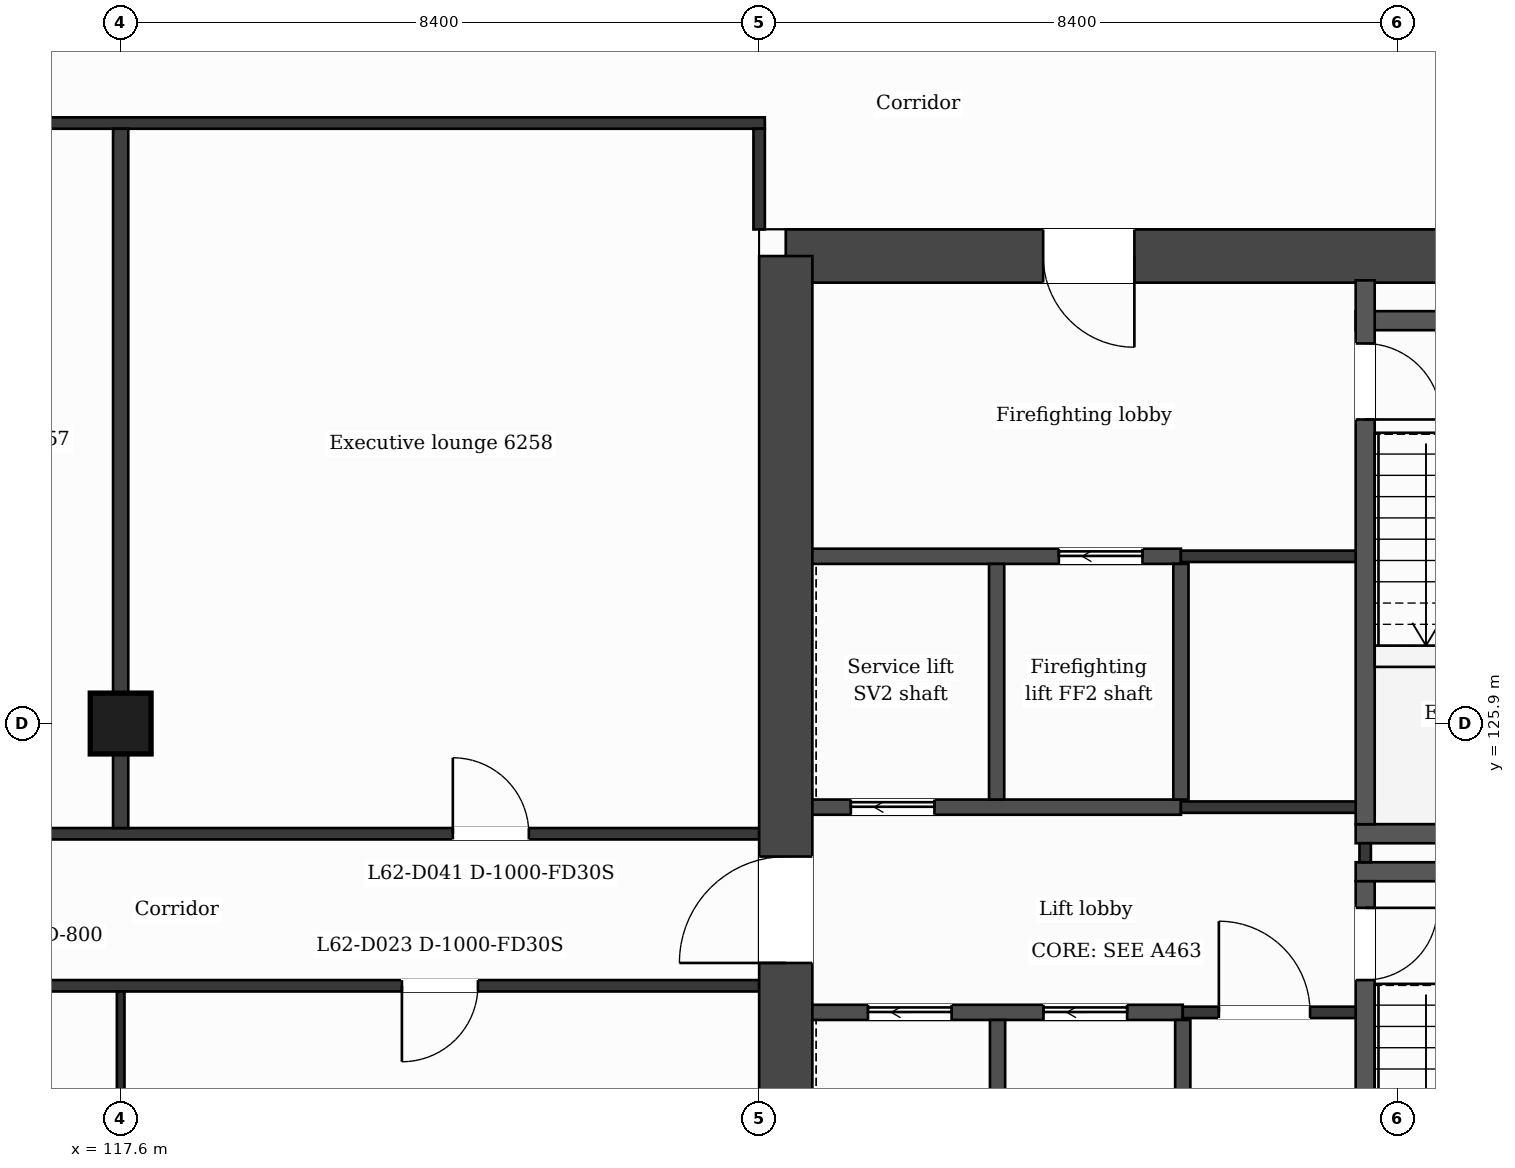
"""IFC4 building model, lengths in metres.
Left out: names, types, materials, properties, quantities, classifications, styles, units other than length and angle.
Written with IfcOpenShell. Run it as: python <this file> out.ifc"""

import sys

from ifc_helpers import new_model, si_unit, direction, frame, frame_2d, origin, origin_2d, place, context, subcontext, project, spatial, rectangle, extrude, element, fill, save


model = new_model("IFC4")
c1 = context("Model", 3, precision=1e-05, world=origin(), true_north=direction((0.0, 1.0)))
c2 = subcontext(c1, "Body", "Model", "MODEL_VIEW")
j1 = project(units=[si_unit("LENGTHUNIT", "METRE"), si_unit("PLANEANGLEUNIT", "RADIAN")], contexts=[c1])
p1 = place(None, origin())
s1 = spatial("IfcSite", under=j1, at=p1, CompositionType="ELEMENT")
p2 = place(p1, origin())
s2 = spatial("IfcBuilding", under=s1, at=p2, CompositionType="ELEMENT")
p3 = place(p2, frame((0.0, 0.0, 259.0)))
s3 = spatial("IfcBuildingStorey", under=s2, at=p3, CompositionType="ELEMENT", Elevation=259.0)
p4 = place(p3, frame((126.35, 132.05, 0.0), z_axis=(0.0, 0.0, 1.0), x_axis=(1.0, 0.0, 0.0)))
e1 = element("IfcWall", 1, at=p4, inside=s3, PredefinedType="SHEAR", context=c2, shape_type="SweptSolid", body=[
    extrude(rectangle(XDim=11.513, YDim=0.7, at=frame_2d((5.757, 0.0))), origin(), (0.0, 0.0, 1.0), 3.7),
])
p5 = place(p4, frame((3.386, 0.0, 0.0)))
e2 = element("IfcOpeningElement", 2, at=p5, cuts=e1, PredefinedType="OPENING", context=c2, shape_type="SweptSolid", body=[
    extrude(rectangle(XDim=1.2, YDim=2.1, at=frame_2d((0.6, 1.05))), frame((0.0, 0.36, 0.0), z_axis=(0.0, -1.0, 0.0), x_axis=(1.0, 0.0, 0.0)), (0.0, 0.0, 1.0), 0.72),
])
p6 = place(p3, frame((126.35, 110.75, 0.0), z_axis=(0.0, 0.0, 1.0), x_axis=(0.0, 1.0, 0.0)))
e3 = element("IfcWall", 3, at=p6, inside=s3, PredefinedType="SHEAR", context=c2, shape_type="SweptSolid", body=[
    extrude(rectangle(XDim=21.3, YDim=0.7, at=frame_2d((10.65, 0.0))), origin(), (0.0, 0.0, 1.0), 3.7),
])
p7 = place(p6, frame((12.0, 0.0, 0.0)))
e4 = element("IfcOpeningElement", 4, at=p7, cuts=e3, PredefinedType="OPENING", context=c2, shape_type="SweptSolid", body=[
    extrude(rectangle(XDim=1.4, YDim=2.1, at=frame_2d((0.7, 1.05))), frame((0.0, 0.36, 0.0), z_axis=(0.0, -1.0, 0.0), x_axis=(1.0, 0.0, 0.0)), (0.0, 0.0, 1.0), 0.72),
])
p8 = place(p3, frame((117.6, 125.9, 0.0), z_axis=(0.0, 0.0, 1.0), x_axis=(1.0, 0.0, 0.0)))
e5 = element("IfcColumn", 5, at=p8, inside=s3, PredefinedType="COLUMN", context=c2, shape_type="SweptSolid", body=[
    extrude(rectangle(XDim=0.8, YDim=0.8, at=origin_2d()), origin(), (0.0, 0.0, 1.0), 3.7),
])
p9 = place(p3, frame((126.7, 122.1, 0.0), z_axis=(0.0, 0.0, 1.0), x_axis=(1.0, 0.0, 0.0)))
e6 = element("IfcWall", 6, at=p9, inside=s3, PredefinedType="PARTITIONING", context=c2, shape_type="SweptSolid", body=[
    extrude(rectangle(XDim=4.873, YDim=0.2, at=frame_2d((2.437, 0.0))), origin(), (0.0, 0.0, 1.0), 3.38),
])
p10 = place(p9, frame((3.041, 0.0, 0.0)))
e7 = element("IfcOpeningElement", 7, at=p10, cuts=e6, PredefinedType="OPENING", context=c2, shape_type="SweptSolid", body=[
    extrude(rectangle(XDim=1.1, YDim=2.1, at=frame_2d((0.55, 1.05))), frame((0.0, 0.11, 0.0), z_axis=(0.0, -1.0, 0.0), x_axis=(1.0, 0.0, 0.0)), (0.0, 0.0, 1.0), 0.22),
])
p11 = place(p9, frame((0.732, 0.0, 0.0)))
e8 = element("IfcOpeningElement", 8, at=p11, cuts=e6, PredefinedType="OPENING", context=c2, shape_type="SweptSolid", body=[
    extrude(rectangle(XDim=1.1, YDim=2.1, at=frame_2d((0.55, 1.05))), frame((0.0, 0.11, 0.0), z_axis=(0.0, -1.0, 0.0), x_axis=(1.0, 0.0, 0.0)), (0.0, 0.0, 1.0), 0.22),
])
p12 = place(p3, frame((131.573, 122.1, 0.0), z_axis=(0.0, 0.0, 1.0), x_axis=(1.0, 0.0, 0.0)))
e9 = element("IfcWall", 9, at=p12, inside=s3, PredefinedType="PARTITIONING", context=c2, shape_type="SweptSolid", body=[
    extrude(rectangle(XDim=2.4, YDim=0.15, at=frame_2d((1.2, 0.0))), origin(), (0.0, 0.0, 1.0), 3.38),
])
p13 = place(p12, frame((0.475, 0.0, 0.0)))
e10 = element("IfcOpeningElement", 10, at=p13, cuts=e9, PredefinedType="OPENING", context=c2, shape_type="SweptSolid", body=[
    extrude(rectangle(XDim=1.2, YDim=2.1, at=frame_2d((0.6, 1.05))), frame((0.0, 0.085, 0.0), z_axis=(0.0, -1.0, 0.0), x_axis=(1.0, 0.0, 0.0)), (0.0, 0.0, 1.0), 0.17),
])
p14 = place(p3, frame((100.8, 122.45, 0.0), z_axis=(0.0, 0.0, 1.0), x_axis=(1.0, 0.0, 0.0)))
e11 = element("IfcWall", 11, at=p14, inside=s3, PredefinedType="PARTITIONING", context=c2, shape_type="SweptSolid", body=[
    extrude(rectangle(XDim=25.2, YDim=0.15, at=frame_2d((12.6, 0.0))), origin(), (0.0, 0.0, 1.0), 3.38),
])
p15 = place(p14, frame((0.63, 0.0, 0.0)))
e12 = element("IfcOpeningElement", 12, at=p15, cuts=e11, PredefinedType="OPENING", context=c2, shape_type="SweptSolid", body=[
    extrude(rectangle(XDim=1.0, YDim=2.1, at=frame_2d((0.5, 1.05))), frame((0.0, 0.085, 0.0), z_axis=(0.0, -1.0, 0.0), x_axis=(1.0, 0.0, 0.0)), (0.0, 0.0, 1.0), 0.17),
])
p16 = place(p14, frame((6.875, 0.0, 0.0)))
e13 = element("IfcOpeningElement", 13, at=p16, cuts=e11, PredefinedType="OPENING", context=c2, shape_type="SweptSolid", body=[
    extrude(rectangle(XDim=0.95, YDim=2.1, at=frame_2d((0.475, 1.05))), frame((0.0, 0.085, 0.0), z_axis=(0.0, -1.0, 0.0), x_axis=(1.0, 0.0, 0.0)), (0.0, 0.0, 1.0), 0.17),
])
p17 = place(p14, frame((8.925, 0.0, 0.0)))
e14 = element("IfcOpeningElement", 14, at=p17, cuts=e11, PredefinedType="OPENING", context=c2, shape_type="SweptSolid", body=[
    extrude(rectangle(XDim=1.0, YDim=2.1, at=frame_2d((0.5, 1.05))), frame((0.0, 0.085, 0.0), z_axis=(0.0, -1.0, 0.0), x_axis=(1.0, 0.0, 0.0)), (0.0, 0.0, 1.0), 0.17),
])
p18 = place(p14, frame((20.5, 0.0, 0.0)))
e15 = element("IfcOpeningElement", 15, at=p18, cuts=e11, PredefinedType="OPENING", context=c2, shape_type="SweptSolid", body=[
    extrude(rectangle(XDim=1.0, YDim=2.1, at=frame_2d((0.5, 1.05))), frame((0.0, 0.085, 0.0), z_axis=(0.0, -1.0, 0.0), x_axis=(1.0, 0.0, 0.0)), (0.0, 0.0, 1.0), 0.17),
])
for number, where, z_axis, x_axis in (
    (16, (133.848, 123.95, 0.0), (0.0, 0.0, 1.0), (1.0, 0.0, 0.0)),
    (17, (133.848, 124.45, 0.0), (0.0, 0.0, 1.0), (1.0, 0.0, 0.0)),
):
    element("IfcWall", number, at=place(p3, frame(where, z_axis=z_axis, x_axis=x_axis)), inside=s3, PredefinedType="PARTITIONING", context=c2, shape_type="SweptSolid", body=[
        extrude(rectangle(XDim=3.4, YDim=0.25, at=frame_2d((1.7, 0.0))), origin(), (0.0, 0.0, 1.0), 3.38),
    ])
p19 = place(p3, frame((100.8, 124.45, 0.0), z_axis=(0.0, 0.0, 1.0), x_axis=(1.0, 0.0, 0.0)))
e18 = element("IfcWall", 18, at=p19, inside=s3, PredefinedType="PARTITIONING", context=c2, shape_type="SweptSolid", body=[
    extrude(rectangle(XDim=25.2, YDim=0.15, at=frame_2d((12.6, 0.0))), origin(), (0.0, 0.0, 1.0), 3.38),
])
p20 = place(p19, frame((2.025, 0.0, 0.0)))
e19 = element("IfcOpeningElement", 19, at=p20, cuts=e18, PredefinedType="OPENING", context=c2, shape_type="SweptSolid", body=[
    extrude(rectangle(XDim=1.0, YDim=2.1, at=frame_2d((0.5, 1.05))), frame((0.0, 0.085, 0.0), z_axis=(0.0, -1.0, 0.0), x_axis=(1.0, 0.0, 0.0)), (0.0, 0.0, 1.0), 0.17),
])
p21 = place(p19, frame((9.27, 0.0, 0.0)))
e20 = element("IfcOpeningElement", 20, at=p21, cuts=e18, PredefinedType="OPENING", context=c2, shape_type="SweptSolid", body=[
    extrude(rectangle(XDim=1.0, YDim=2.1, at=frame_2d((0.5, 1.05))), frame((0.0, 0.085, 0.0), z_axis=(0.0, -1.0, 0.0), x_axis=(1.0, 0.0, 0.0)), (0.0, 0.0, 1.0), 0.17),
])
p22 = place(p19, frame((13.575, 0.0, 0.0)))
e21 = element("IfcOpeningElement", 21, at=p22, cuts=e18, PredefinedType="OPENING", context=c2, shape_type="SweptSolid", body=[
    extrude(rectangle(XDim=1.0, YDim=2.1, at=frame_2d((0.5, 1.05))), frame((0.0, 0.085, 0.0), z_axis=(0.0, -1.0, 0.0), x_axis=(1.0, 0.0, 0.0)), (0.0, 0.0, 1.0), 0.17),
])
p23 = place(p19, frame((21.17, 0.0, 0.0)))
e22 = element("IfcOpeningElement", 22, at=p23, cuts=e18, PredefinedType="OPENING", context=c2, shape_type="SweptSolid", body=[
    extrude(rectangle(XDim=1.0, YDim=2.1, at=frame_2d((0.5, 1.05))), frame((0.0, 0.085, 0.0), z_axis=(0.0, -1.0, 0.0), x_axis=(1.0, 0.0, 0.0)), (0.0, 0.0, 1.0), 0.17),
])
p24 = place(p3, frame((126.7, 124.8, 0.0), z_axis=(0.0, 0.0, 1.0), x_axis=(1.0, 0.0, 0.0)))
e23 = element("IfcWall", 23, at=p24, inside=s3, PredefinedType="PARTITIONING", context=c2, shape_type="SweptSolid", body=[
    extrude(rectangle(XDim=4.849, YDim=0.2, at=frame_2d((2.424, 0.0))), origin(), (0.0, 0.0, 1.0), 3.38),
])
p25 = place(p24, frame((0.506, 0.0, 0.0)))
e24 = element("IfcOpeningElement", 24, at=p25, cuts=e23, PredefinedType="OPENING", context=c2, shape_type="SweptSolid", body=[
    extrude(rectangle(XDim=1.1, YDim=2.1, at=frame_2d((0.55, 1.05))), frame((0.0, 0.11, 0.0), z_axis=(0.0, -1.0, 0.0), x_axis=(1.0, 0.0, 0.0)), (0.0, 0.0, 1.0), 0.22),
])
p26 = place(p3, frame((131.549, 124.8, 0.0), z_axis=(0.0, 0.0, 1.0), x_axis=(1.0, 0.0, 0.0)))
e25 = element("IfcWall", 25, at=p26, inside=s3, PredefinedType="PARTITIONING", context=c2, shape_type="SweptSolid", body=[
    extrude(rectangle(XDim=2.549, YDim=0.15, at=frame_2d((1.275, 0.0))), origin(), (0.0, 0.0, 1.0), 3.38),
])
p27 = place(p3, frame((126.7, 128.1, 0.0), z_axis=(0.0, 0.0, 1.0), x_axis=(1.0, 0.0, 0.0)))
e26 = element("IfcWall", 26, at=p27, inside=s3, PredefinedType="PARTITIONING", context=c2, shape_type="SweptSolid", body=[
    extrude(rectangle(XDim=4.849, YDim=0.2, at=frame_2d((2.424, 0.0))), origin(), (0.0, 0.0, 1.0), 3.38),
])
p28 = place(p27, frame((3.243, 0.0, 0.0)))
e27 = element("IfcOpeningElement", 27, at=p28, cuts=e26, PredefinedType="OPENING", context=c2, shape_type="SweptSolid", body=[
    extrude(rectangle(XDim=1.1, YDim=2.1, at=frame_2d((0.55, 1.05))), frame((0.0, 0.11, 0.0), z_axis=(0.0, -1.0, 0.0), x_axis=(1.0, 0.0, 0.0)), (0.0, 0.0, 1.0), 0.22),
])
p29 = place(p3, frame((131.549, 128.1, 0.0), z_axis=(0.0, 0.0, 1.0), x_axis=(1.0, 0.0, 0.0)))
e28 = element("IfcWall", 28, at=p29, inside=s3, PredefinedType="PARTITIONING", context=c2, shape_type="SweptSolid", body=[
    extrude(rectangle(XDim=2.424, YDim=0.15, at=frame_2d((1.212, 0.0))), origin(), (0.0, 0.0, 1.0), 3.38),
])
p30 = place(p3, frame((133.848, 131.2, 0.0), z_axis=(0.0, 0.0, 1.0), x_axis=(1.0, 0.0, 0.0)))
e29 = element("IfcWall", 29, at=p30, inside=s3, PredefinedType="PARTITIONING", context=c2, shape_type="SweptSolid", body=[
    extrude(rectangle(XDim=3.807, YDim=0.25, at=frame_2d((1.903, 0.0))), origin(), (0.0, 0.0, 1.0), 3.38),
])
p31 = place(p3, frame((100.725, 133.8, 0.0), z_axis=(0.0, 0.0, 1.0), x_axis=(1.0, 0.0, 0.0)))
e30 = element("IfcWall", 30, at=p31, inside=s3, PredefinedType="PARTITIONING", context=c2, shape_type="SweptSolid", body=[
    extrude(rectangle(XDim=25.35, YDim=0.15, at=frame_2d((12.675, 0.0))), origin(), (0.0, 0.0, 1.0), 3.38),
])
p32 = place(p31, frame((10.7, 0.0, 0.0)))
e31 = element("IfcOpeningElement", 31, at=p32, cuts=e30, PredefinedType="OPENING", context=c2, shape_type="SweptSolid", body=[
    extrude(rectangle(XDim=1.0, YDim=2.1, at=frame_2d((0.5, 1.05))), frame((0.0, 0.085, 0.0), z_axis=(0.0, -1.0, 0.0), x_axis=(1.0, 0.0, 0.0)), (0.0, 0.0, 1.0), 0.17),
])
p33 = place(p3, frame((117.6, 110.55, 0.0), z_axis=(0.0, 0.0, 1.0), x_axis=(0.0, 1.0, 0.0)))
e32 = element("IfcWall", 32, at=p33, inside=s3, PredefinedType="PARTITIONING", context=c2, shape_type="SweptSolid", body=[
    extrude(rectangle(XDim=11.825, YDim=0.1, at=frame_2d((5.913, 0.0))), origin(), (0.0, 0.0, 1.0), 3.38),
])
p34 = place(p33, frame((9.09, 0.0, 0.0)))
e33 = element("IfcOpeningElement", 33, at=p34, cuts=e32, PredefinedType="OPENING", context=c2, shape_type="SweptSolid", body=[
    extrude(rectangle(XDim=0.9, YDim=2.1, at=frame_2d((0.45, 1.05))), frame((0.0, 0.06, 0.0), z_axis=(0.0, -1.0, 0.0), x_axis=(1.0, 0.0, 0.0)), (0.0, 0.0, 1.0), 0.12),
])
p35 = place(p3, frame((117.6, 124.525, 0.0), z_axis=(0.0, 0.0, 1.0), x_axis=(0.0, 1.0, 0.0)))
e34 = element("IfcWall", 34, at=p35, inside=s3, PredefinedType="PARTITIONING", context=c2, shape_type="SweptSolid", body=[
    extrude(rectangle(XDim=9.2, YDim=0.2, at=frame_2d((4.6, 0.0))), origin(), (0.0, 0.0, 1.0), 3.38),
])
p36 = place(p3, frame((126.0, 132.4, 0.0), z_axis=(0.0, 0.0, 1.0), x_axis=(0.0, 1.0, 0.0)))
e35 = element("IfcWall", 35, at=p36, inside=s3, PredefinedType="PARTITIONING", context=c2, shape_type="SweptSolid", body=[
    extrude(rectangle(XDim=1.325, YDim=0.15, at=frame_2d((0.663, 0.0))), origin(), (0.0, 0.0, 1.0), 3.38),
])
for number, where, z_axis, x_axis in (
    (36, (129.124, 124.9, 0.0), (0.0, 0.0, 1.0), (0.0, 1.0, 0.0)),
    (37, (129.136, 118.9, 0.0), (0.0, 0.0, 1.0), (0.0, 1.0, 0.0)),
    (38, (131.549, 124.9, 0.0), (0.0, 0.0, 1.0), (0.0, 1.0, 0.0)),
):
    element("IfcWall", number, at=place(p3, frame(where, z_axis=z_axis, x_axis=x_axis)), inside=s3, PredefinedType="PARTITIONING", context=c2, shape_type="SweptSolid", body=[
        extrude(rectangle(XDim=3.1, YDim=0.2, at=frame_2d((1.55, 0.0))), origin(), (0.0, 0.0, 1.0), 3.38),
    ])
p37 = place(p3, frame((131.573, 116.67, 0.0), z_axis=(0.0, 0.0, 1.0), x_axis=(0.0, 1.0, 0.0)))
e39 = element("IfcWall", 39, at=p37, inside=s3, PredefinedType="PARTITIONING", context=c2, shape_type="SweptSolid", body=[
    extrude(rectangle(XDim=5.33, YDim=0.2, at=frame_2d((2.665, 0.0))), origin(), (0.0, 0.0, 1.0), 3.38),
])
p38 = place(p37, frame((0.88, 0.0, 0.0)))
e40 = element("IfcOpeningElement", 40, at=p38, cuts=e39, PredefinedType="OPENING", context=c2, shape_type="SweptSolid", body=[
    extrude(rectangle(XDim=0.9, YDim=2.1, at=frame_2d((0.45, 1.05))), frame((0.0, 0.11, 0.0), z_axis=(0.0, -1.0, 0.0), x_axis=(1.0, 0.0, 0.0)), (0.0, 0.0, 1.0), 0.22),
])
p39 = place(p3, frame((133.973, 124.075, 0.0), z_axis=(0.0, 0.0, 1.0), x_axis=(0.0, 1.0, 0.0)))
e41 = element("IfcWall", 41, at=p39, inside=s3, PredefinedType="PARTITIONING", context=c2, shape_type="SweptSolid", body=[
    extrude(rectangle(XDim=0.25, YDim=0.15, at=frame_2d((0.125, 0.0))), origin(), (0.0, 0.0, 1.0), 3.38),
])
p40 = place(p3, frame((133.973, 116.67, 0.0), z_axis=(0.0, 0.0, 1.0), x_axis=(0.0, 1.0, 0.0)))
e42 = element("IfcWall", 42, at=p40, inside=s3, PredefinedType="PARTITIONING", context=c2, shape_type="SweptSolid", body=[
    extrude(rectangle(XDim=7.155, YDim=0.25, at=frame_2d((3.578, 0.0))), origin(), (0.0, 0.0, 1.0), 3.38),
])
p41 = place(p40, frame((5.855, 0.0, 0.0)))
e43 = element("IfcOpeningElement", 43, at=p41, cuts=e42, PredefinedType="OPENING", context=c2, shape_type="SweptSolid", body=[
    extrude(rectangle(XDim=0.95, YDim=2.1, at=frame_2d((0.475, 1.05))), frame((0.0, 0.135, 0.0), z_axis=(0.0, -1.0, 0.0), x_axis=(1.0, 0.0, 0.0)), (0.0, 0.0, 1.0), 0.27),
])
p42 = place(p3, frame((133.973, 124.575, 0.0), z_axis=(0.0, 0.0, 1.0), x_axis=(0.0, 1.0, 0.0)))
e44 = element("IfcWall", 44, at=p42, inside=s3, PredefinedType="PARTITIONING", context=c2, shape_type="SweptSolid", body=[
    extrude(rectangle(XDim=7.155, YDim=0.25, at=frame_2d((3.578, 0.0))), origin(), (0.0, 0.0, 1.0), 3.38),
])
p43 = place(p42, frame((5.325, 0.0, 0.0)))
e45 = element("IfcOpeningElement", 45, at=p43, cuts=e44, PredefinedType="OPENING", context=c2, shape_type="SweptSolid", body=[
    extrude(rectangle(XDim=1.0, YDim=2.1, at=frame_2d((0.5, 1.05))), frame((0.0, 0.135, 0.0), z_axis=(0.0, -1.0, 0.0), x_axis=(1.0, 0.0, 0.0)), (0.0, 0.0, 1.0), 0.27),
])
p44 = place(p13, origin())
e46 = element("IfcDoor", 46, at=p44, inside=s3, OperationType="SINGLE_SWING_LEFT", PredefinedType="DOOR", context=c2, shape_type="SweptSolid", body=[
    extrude(rectangle(XDim=1.2, YDim=2.1, at=frame_2d((0.6, 1.05))), frame((0.0, 0.025, 0.0), z_axis=(0.0, -1.0, 0.0), x_axis=(1.0, 0.0, 0.0)), (0.0, 0.0, 1.0), 0.05),
])
fill(e10, e46)
p45 = place(p10, origin())
e47 = element("IfcDoor", 47, at=p45, inside=s3, OperationType="SLIDING_TO_LEFT", PredefinedType="DOOR", context=c2, shape_type="SweptSolid", body=[
    extrude(rectangle(XDim=1.1, YDim=2.1, at=frame_2d((0.55, 1.05))), frame((0.0, 0.025, 0.0), z_axis=(0.0, -1.0, 0.0), x_axis=(1.0, 0.0, 0.0)), (0.0, 0.0, 1.0), 0.05),
])
fill(e7, e47)
p46 = place(p11, origin())
e48 = element("IfcDoor", 48, at=p46, inside=s3, OperationType="SLIDING_TO_LEFT", PredefinedType="DOOR", context=c2, shape_type="SweptSolid", body=[
    extrude(rectangle(XDim=1.1, YDim=2.1, at=frame_2d((0.55, 1.05))), frame((0.0, 0.025, 0.0), z_axis=(0.0, -1.0, 0.0), x_axis=(1.0, 0.0, 0.0)), (0.0, 0.0, 1.0), 0.05),
])
fill(e8, e48)
p47 = place(p28, origin())
e49 = element("IfcDoor", 49, at=p47, inside=s3, OperationType="SLIDING_TO_LEFT", PredefinedType="DOOR", context=c2, shape_type="SweptSolid", body=[
    extrude(rectangle(XDim=1.1, YDim=2.1, at=frame_2d((0.55, 1.05))), frame((0.0, 0.025, 0.0), z_axis=(0.0, -1.0, 0.0), x_axis=(1.0, 0.0, 0.0)), (0.0, 0.0, 1.0), 0.05),
])
fill(e27, e49)
p48 = place(p25, origin())
e50 = element("IfcDoor", 50, at=p48, inside=s3, OperationType="SLIDING_TO_LEFT", PredefinedType="DOOR", context=c2, shape_type="SweptSolid", body=[
    extrude(rectangle(XDim=1.1, YDim=2.1, at=frame_2d((0.55, 1.05))), frame((0.0, 0.025, 0.0), z_axis=(0.0, -1.0, 0.0), x_axis=(1.0, 0.0, 0.0)), (0.0, 0.0, 1.0), 0.05),
])
fill(e24, e50)
p49 = place(p41, origin())
e51 = element("IfcDoor", 51, at=p49, inside=s3, OperationType="SINGLE_SWING_RIGHT", PredefinedType="DOOR", context=c2, shape_type="SweptSolid", body=[
    extrude(rectangle(XDim=0.95, YDim=2.1, at=frame_2d((0.475, 1.05))), frame((0.0, 0.025, 0.0), z_axis=(0.0, -1.0, 0.0), x_axis=(1.0, 0.0, 0.0)), (0.0, 0.0, 1.0), 0.05),
])
fill(e43, e51)
p50 = place(p43, origin())
e52 = element("IfcDoor", 52, at=p50, inside=s3, OperationType="SINGLE_SWING_LEFT", PredefinedType="DOOR", context=c2, shape_type="SweptSolid", body=[
    extrude(rectangle(XDim=1.0, YDim=2.1, at=frame_2d((0.5, 1.05))), frame((0.0, 0.025, 0.0), z_axis=(0.0, -1.0, 0.0), x_axis=(1.0, 0.0, 0.0)), (0.0, 0.0, 1.0), 0.05),
])
fill(e45, e52)
p51 = place(p18, origin())
e53 = element("IfcDoor", 53, at=p51, inside=s3, OperationType="SINGLE_SWING_LEFT", PredefinedType="DOOR", context=c2, shape_type="SweptSolid", body=[
    extrude(rectangle(XDim=1.0, YDim=2.1, at=frame_2d((0.5, 1.05))), frame((0.0, 0.025, 0.0), z_axis=(0.0, -1.0, 0.0), x_axis=(1.0, 0.0, 0.0)), (0.0, 0.0, 1.0), 0.05),
])
fill(e15, e53)
p52 = place(p23, origin())
e54 = element("IfcDoor", 54, at=p52, inside=s3, OperationType="SINGLE_SWING_LEFT", PredefinedType="DOOR", context=c2, shape_type="SweptSolid", body=[
    extrude(rectangle(XDim=1.0, YDim=2.1, at=frame_2d((0.5, 1.05))), frame((0.0, 0.025, 0.0), z_axis=(0.0, -1.0, 0.0), x_axis=(1.0, 0.0, 0.0)), (0.0, 0.0, 1.0), 0.05),
])
fill(e22, e54)
p53 = place(p5, origin())
e55 = element("IfcDoor", 55, at=p53, inside=s3, OperationType="SINGLE_SWING_RIGHT", PredefinedType="DOOR", context=c2, shape_type="SweptSolid", body=[
    extrude(rectangle(XDim=1.2, YDim=2.1, at=frame_2d((0.6, 1.05))), frame((0.0, 0.025, 0.0), z_axis=(0.0, -1.0, 0.0), x_axis=(1.0, 0.0, 0.0)), (0.0, 0.0, 1.0), 0.05),
])
fill(e2, e55)
p54 = place(p7, origin())
e56 = element("IfcDoor", 56, at=p54, inside=s3, OperationType="SINGLE_SWING_LEFT", PredefinedType="DOOR", context=c2, shape_type="SweptSolid", body=[
    extrude(rectangle(XDim=1.4, YDim=2.1, at=frame_2d((0.7, 1.05))), frame((0.0, 0.025, 0.0), z_axis=(0.0, -1.0, 0.0), x_axis=(1.0, 0.0, 0.0)), (0.0, 0.0, 1.0), 0.05),
])
fill(e4, e56)
save(model, sys.argv[1])
